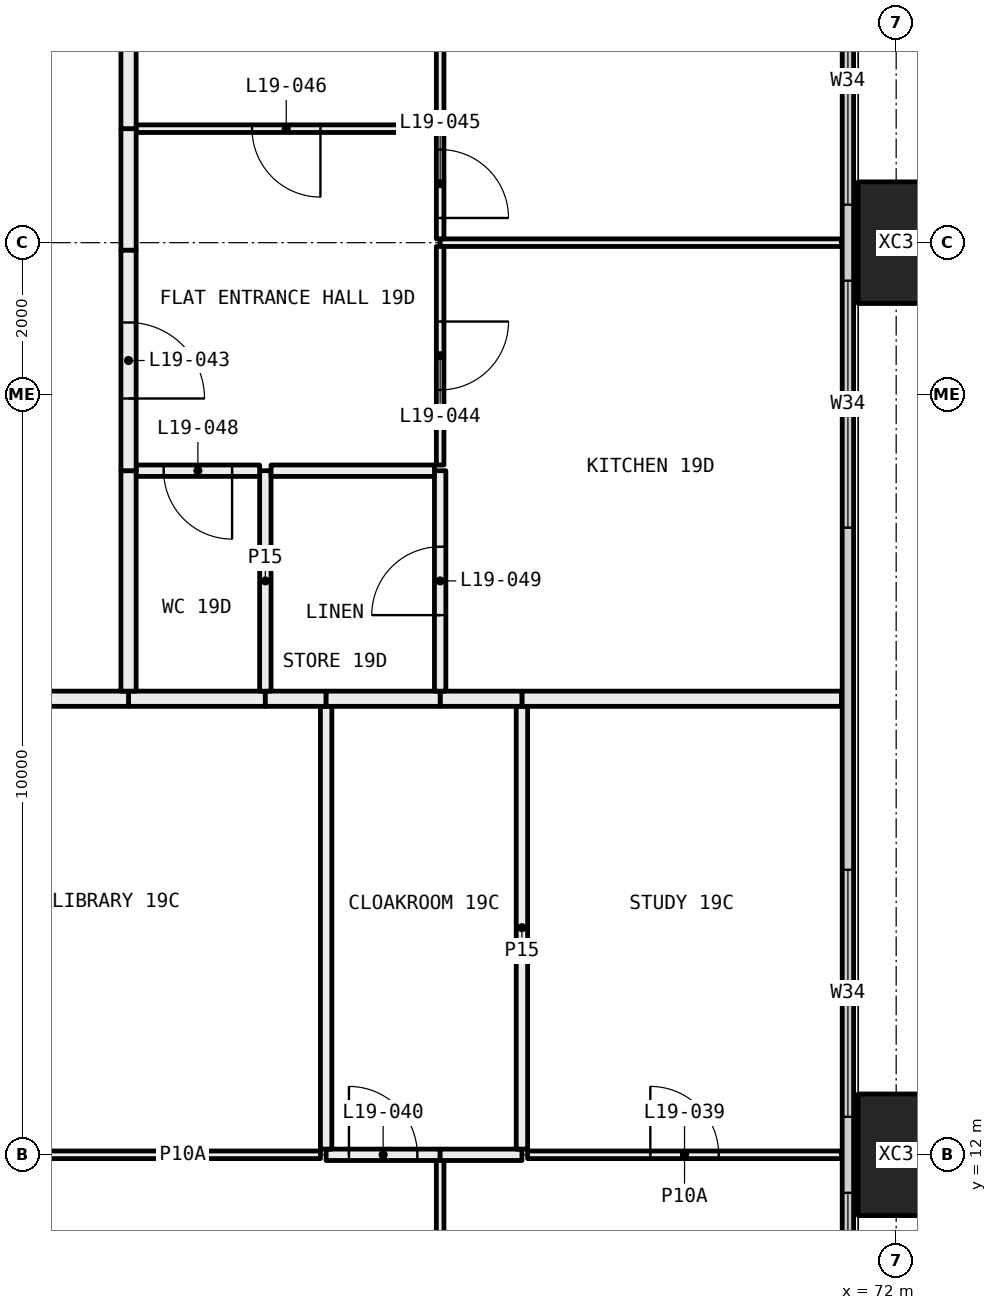
"""IFC4 building model, lengths in metres.
Left out: names, types, materials, properties, quantities, classifications, styles, units other than length and angle.
Written with IfcOpenShell. Run it as: python <this file> out.ifc"""

import sys

from ifc_helpers import new_model, si_unit, direction, frame, frame_2d, origin, origin_2d, place, context, subcontext, project, spatial, rectangle, hollow_rectangle, extrude, element, fill, save


model = new_model("IFC4")
c1 = context("Model", 3, precision=1e-05, world=origin(), true_north=direction((0.0, 1.0)))
c2 = subcontext(c1, "Body", "Model", "MODEL_VIEW")
j1 = project(units=[si_unit("LENGTHUNIT", "METRE"), si_unit("PLANEANGLEUNIT", "RADIAN")], contexts=[c1])
p1 = place(None, origin())
s1 = spatial("IfcSite", under=j1, at=p1, CompositionType="ELEMENT")
p2 = place(p1, origin())
s2 = spatial("IfcBuilding", under=s1, at=p2, CompositionType="ELEMENT")
p3 = place(p2, frame((0.0, 0.0, 78.3)))
s3 = spatial("IfcBuildingStorey", under=s2, at=p3, CompositionType="ELEMENT", Elevation=78.3)
for number, where, z_axis, x_axis in (
    (1, (72.0, 12.0, -0.4), (0.0, 0.0, 1.0), (0.0, 1.0, 0.0)),
    (2, (72.0, 24.0, -0.4), (0.0, 0.0, 1.0), (0.0, 1.0, 0.0)),
):
    element("IfcColumn", number, at=place(p3, frame(where, z_axis=z_axis, x_axis=x_axis)), inside=s3, PredefinedType="COLUMN", context=c2, shape_type="SweptSolid", body=[
        extrude(hollow_rectangle(XDim=1.6, YDim=1.0, WallThickness=0.065, at=origin_2d()), origin(), (0.0, 0.0, 1.0), 3.45),
    ])
p4 = place(p3, frame((71.365, 6.71, 0.0), z_axis=(0.0, 0.0, 1.0), x_axis=(0.0, 1.0, 0.0)))
e3 = element("IfcWall", 3, at=p4, inside=s3, PredefinedType="ELEMENTEDWALL", context=c2, shape_type="SweptSolid", body=[
    extrude(rectangle(XDim=34.58, YDim=0.15, at=frame_2d((17.29, 0.0))), origin(), (0.0, 0.0, 1.0), 3.05),
])
p5 = place(p4, frame((0.29, 0.0, 0.45)))
e4 = element("IfcOpeningElement", 4, at=p5, cuts=e3, PredefinedType="OPENING", context=c2, shape_type="SweptSolid", body=[
    extrude(rectangle(XDim=4.5, YDim=2.55, at=frame_2d((2.25, 1.275))), frame((0.0, 0.085, 0.0), z_axis=(0.0, -1.0, 0.0), x_axis=(1.0, 0.0, 0.0)), (0.0, 0.0, 1.0), 0.17),
])
p6 = place(p4, frame((5.79, 0.0, 0.45)))
e5 = element("IfcOpeningElement", 5, at=p6, cuts=e3, PredefinedType="OPENING", context=c2, shape_type="SweptSolid", body=[
    extrude(rectangle(XDim=3.25, YDim=2.55, at=frame_2d((1.625, 1.275))), frame((0.0, 0.085, 0.0), z_axis=(0.0, -1.0, 0.0), x_axis=(1.0, 0.0, 0.0)), (0.0, 0.0, 1.0), 0.17),
])
p7 = place(p4, frame((13.54, 0.0, 0.45)))
e6 = element("IfcOpeningElement", 6, at=p7, cuts=e3, PredefinedType="OPENING", context=c2, shape_type="SweptSolid", body=[
    extrude(rectangle(XDim=3.25, YDim=2.55, at=frame_2d((1.625, 1.275))), frame((0.0, 0.085, 0.0), z_axis=(0.0, -1.0, 0.0), x_axis=(1.0, 0.0, 0.0)), (0.0, 0.0, 1.0), 0.17),
])
p8 = place(p4, frame((17.79, 0.0, 0.45)))
e7 = element("IfcOpeningElement", 7, at=p8, cuts=e3, PredefinedType="OPENING", context=c2, shape_type="SweptSolid", body=[
    extrude(rectangle(XDim=3.25, YDim=2.55, at=frame_2d((1.625, 1.275))), frame((0.0, 0.085, 0.0), z_axis=(0.0, -1.0, 0.0), x_axis=(1.0, 0.0, 0.0)), (0.0, 0.0, 1.0), 0.17),
])
p9 = place(p4, frame((26.79, 0.0, 0.45)))
e8 = element("IfcOpeningElement", 8, at=p9, cuts=e3, PredefinedType="OPENING", context=c2, shape_type="SweptSolid", body=[
    extrude(rectangle(XDim=2.0, YDim=2.55, at=frame_2d((1.0, 1.275))), frame((0.0, 0.085, 0.0), z_axis=(0.0, -1.0, 0.0), x_axis=(1.0, 0.0, 0.0)), (0.0, 0.0, 1.0), 0.17),
])
p10 = place(p4, frame((29.79, 0.0, 0.45)))
e9 = element("IfcOpeningElement", 9, at=p10, cuts=e3, PredefinedType="OPENING", context=c2, shape_type="SweptSolid", body=[
    extrude(rectangle(XDim=4.5, YDim=2.55, at=frame_2d((2.25, 1.275))), frame((0.0, 0.085, 0.0), z_axis=(0.0, -1.0, 0.0), x_axis=(1.0, 0.0, 0.0)), (0.0, 0.0, 1.0), 0.17),
])
p11 = place(p3, frame((66.0, 6.72, 0.0), z_axis=(0.0, 0.0, 1.0), x_axis=(0.0, 1.0, 0.0)))
e10 = element("IfcWall", 10, at=p11, inside=s3, PredefinedType="PARTITIONING", context=c2, shape_type="SweptSolid", body=[
    extrude(rectangle(XDim=5.205, YDim=0.1, at=frame_2d((2.603, 0.0))), origin(), (0.0, 0.0, 1.0), 2.45),
])
p12 = place(p11, frame((2.153, 0.0, 0.0)))
e11 = element("IfcOpeningElement", 11, at=p12, cuts=e10, PredefinedType="OPENING", context=c2, shape_type="SweptSolid", body=[
    extrude(rectangle(XDim=0.9, YDim=2.1, at=frame_2d((0.45, 1.05))), frame((0.0, 0.06, 0.0), z_axis=(0.0, -1.0, 0.0), x_axis=(1.0, 0.0, 0.0)), (0.0, 0.0, 1.0), 0.12),
])
p13 = place(p3, frame((64.425, 12.0, 0.0), z_axis=(0.0, 0.0, 1.0), x_axis=(-1.0, 0.0, 0.0)))
e12 = element("IfcWall", 12, at=p13, inside=s3, PredefinedType="PARTITIONING", context=c2, shape_type="SweptSolid", body=[
    extrude(rectangle(XDim=3.625, YDim=0.1, at=frame_2d((1.812, 0.0))), origin(), (0.0, 0.0, 1.0), 2.45),
])
p14 = place(p3, frame((66.0, 12.0, 0.0), z_axis=(0.0, 0.0, 1.0), x_axis=(-1.0, 0.0, 0.0)))
e13 = element("IfcWall", 13, at=p14, inside=s3, PredefinedType="PARTITIONING", context=c2, shape_type="SweptSolid", body=[
    extrude(rectangle(XDim=1.5, YDim=0.15, at=frame_2d((0.75, 0.0))), origin(), (0.0, 0.0, 1.0), 2.45),
])
p15 = place(p14, frame((0.3, 0.0, 0.0)))
e14 = element("IfcOpeningElement", 14, at=p15, cuts=e13, PredefinedType="OPENING", context=c2, shape_type="SweptSolid", body=[
    extrude(rectangle(XDim=0.9, YDim=2.1, at=frame_2d((0.45, 1.05))), frame((0.0, 0.085, 0.0), z_axis=(0.0, -1.0, 0.0), x_axis=(1.0, 0.0, 0.0)), (0.0, 0.0, 1.0), 0.17),
])
p16 = place(p3, frame((71.28, 12.0, 0.0), z_axis=(0.0, 0.0, 1.0), x_axis=(-1.0, 0.0, 0.0)))
e15 = element("IfcWall", 15, at=p16, inside=s3, PredefinedType="PARTITIONING", context=c2, shape_type="SweptSolid", body=[
    extrude(rectangle(XDim=4.129, YDim=0.1, at=frame_2d((2.064, 0.0))), origin(), (0.0, 0.0, 1.0), 2.45),
])
p17 = place(p16, frame((1.615, 0.0, 0.0)))
e16 = element("IfcOpeningElement", 16, at=p17, cuts=e15, PredefinedType="OPENING", context=c2, shape_type="SweptSolid", body=[
    extrude(rectangle(XDim=0.9, YDim=2.1, at=frame_2d((0.45, 1.05))), frame((0.0, 0.06, 0.0), z_axis=(0.0, -1.0, 0.0), x_axis=(1.0, 0.0, 0.0)), (0.0, 0.0, 1.0), 0.12),
])
p18 = place(p3, frame((67.076, 12.0, 0.0), z_axis=(0.0, 0.0, 1.0), x_axis=(-1.0, 0.0, 0.0)))
e17 = element("IfcWall", 17, at=p18, inside=s3, PredefinedType="PARTITIONING", context=c2, shape_type="SweptSolid", body=[
    extrude(rectangle(XDim=1.076, YDim=0.15, at=frame_2d((0.538, 0.0))), origin(), (0.0, 0.0, 1.0), 2.45),
])
p19 = place(p3, frame((64.5, 12.075, 0.0), z_axis=(0.0, 0.0, 1.0), x_axis=(0.0, 1.0, 0.0)))
e18 = element("IfcWall", 18, at=p19, inside=s3, PredefinedType="PARTITIONING", context=c2, shape_type="SweptSolid", body=[
    extrude(rectangle(XDim=5.825, YDim=0.15, at=frame_2d((2.913, 0.0))), origin(), (0.0, 0.0, 1.0), 2.45),
])
p20 = place(p3, frame((63.7, 18.0, 0.0), z_axis=(0.0, 0.0, 1.0), x_axis=(-1.0, 0.0, 0.0)))
e19 = element("IfcWall", 19, at=p20, inside=s3, PredefinedType="PARTITIONING", context=c2, shape_type="SweptSolid", body=[
    extrude(rectangle(XDim=1.8, YDim=0.2, at=frame_2d((0.9, 0.0))), origin(), (0.0, 0.0, 1.0), 3.05),
])
p21 = place(p3, frame((64.5, 18.0, 0.0), z_axis=(0.0, 0.0, 1.0), x_axis=(-1.0, 0.0, 0.0)))
e20 = element("IfcWall", 20, at=p21, inside=s3, PredefinedType="PARTITIONING", context=c2, shape_type="SweptSolid", body=[
    extrude(rectangle(XDim=0.8, YDim=0.2, at=frame_2d((0.4, 0.0))), origin(), (0.0, 0.0, 1.0), 3.05),
])
p22 = place(p3, frame((61.9, 18.0, 0.0), z_axis=(0.0, 0.0, 1.0), x_axis=(-1.0, 0.0, 0.0)))
e21 = element("IfcWall", 21, at=p22, inside=s3, PredefinedType="PARTITIONING", context=c2, shape_type="SweptSolid", body=[
    extrude(rectangle(XDim=4.9, YDim=0.2, at=frame_2d((2.45, 0.0))), origin(), (0.0, 0.0, 1.0), 3.05),
])
p23 = place(p3, frame((67.076, 17.9, 0.0), z_axis=(0.0, 0.0, 1.0), x_axis=(0.0, -1.0, 0.0)))
e22 = element("IfcWall", 22, at=p23, inside=s3, PredefinedType="PARTITIONING", context=c2, shape_type="SweptSolid", body=[
    extrude(rectangle(XDim=5.825, YDim=0.15, at=frame_2d((2.913, 0.0))), origin(), (0.0, 0.0, 1.0), 2.45),
])
p24 = place(p3, frame((71.28, 18.0, 0.0), z_axis=(0.0, 0.0, 1.0), x_axis=(-1.0, 0.0, 0.0)))
e23 = element("IfcWall", 23, at=p24, inside=s3, PredefinedType="PARTITIONING", context=c2, shape_type="SweptSolid", body=[
    extrude(rectangle(XDim=4.204, YDim=0.2, at=frame_2d((2.102, 0.0))), origin(), (0.0, 0.0, 1.0), 3.05),
])
p25 = place(p3, frame((67.076, 18.0, 0.0), z_axis=(0.0, 0.0, 1.0), x_axis=(-1.0, 0.0, 0.0)))
e24 = element("IfcWall", 24, at=p25, inside=s3, PredefinedType="PARTITIONING", context=c2, shape_type="SweptSolid", body=[
    extrude(rectangle(XDim=1.076, YDim=0.2, at=frame_2d((0.538, 0.0))), origin(), (0.0, 0.0, 1.0), 3.05),
])
p26 = place(p3, frame((66.0, 18.0, 0.0), z_axis=(0.0, 0.0, 1.0), x_axis=(-1.0, 0.0, 0.0)))
e25 = element("IfcWall", 25, at=p26, inside=s3, PredefinedType="PARTITIONING", context=c2, shape_type="SweptSolid", body=[
    extrude(rectangle(XDim=1.5, YDim=0.2, at=frame_2d((0.75, 0.0))), origin(), (0.0, 0.0, 1.0), 3.05),
])
p27 = place(p3, frame((71.28, 24.0, 0.0), z_axis=(0.0, 0.0, 1.0), x_axis=(-1.0, 0.0, 0.0)))
e26 = element("IfcWall", 26, at=p27, inside=s3, PredefinedType="PARTITIONING", context=c2, shape_type="SweptSolid", body=[
    extrude(rectangle(XDim=5.28, YDim=0.1, at=frame_2d((2.64, 0.0))), origin(), (0.0, 0.0, 1.0), 2.45),
])
p28 = place(p3, frame((66.0, 21.0, 0.0), z_axis=(0.0, 0.0, 1.0), x_axis=(0.0, -1.0, 0.0)))
e27 = element("IfcWall", 27, at=p28, inside=s3, PredefinedType="PARTITIONING", context=c2, shape_type="SweptSolid", body=[
    extrude(rectangle(XDim=2.9, YDim=0.15, at=frame_2d((1.45, 0.0))), origin(), (0.0, 0.0, 1.0), 3.05),
])
p29 = place(p28, frame((1.0, 0.0, 0.0)))
e28 = element("IfcOpeningElement", 28, at=p29, cuts=e27, PredefinedType="OPENING", context=c2, shape_type="SweptSolid", body=[
    extrude(rectangle(XDim=0.9, YDim=2.1, at=frame_2d((0.45, 1.05))), frame((0.0, 0.085, 0.0), z_axis=(0.0, -1.0, 0.0), x_axis=(1.0, 0.0, 0.0)), (0.0, 0.0, 1.0), 0.17),
])
p30 = place(p3, frame((66.0, 23.95, 0.0), z_axis=(0.0, 0.0, 1.0), x_axis=(0.0, -1.0, 0.0)))
e29 = element("IfcWall", 29, at=p30, inside=s3, PredefinedType="PARTITIONING", context=c2, shape_type="SweptSolid", body=[
    extrude(rectangle(XDim=2.875, YDim=0.1, at=frame_2d((1.438, 0.0))), origin(), (0.0, 0.0, 1.0), 2.45),
])
p31 = place(p30, frame((0.988, 0.0, 0.0)))
e30 = element("IfcOpeningElement", 30, at=p31, cuts=e29, PredefinedType="OPENING", context=c2, shape_type="SweptSolid", body=[
    extrude(rectangle(XDim=0.9, YDim=2.1, at=frame_2d((0.45, 1.05))), frame((0.0, 0.06, 0.0), z_axis=(0.0, -1.0, 0.0), x_axis=(1.0, 0.0, 0.0)), (0.0, 0.0, 1.0), 0.12),
])
p32 = place(p3, frame((66.0, 25.5, 0.0), z_axis=(0.0, 0.0, 1.0), x_axis=(0.0, -1.0, 0.0)))
e31 = element("IfcWall", 31, at=p32, inside=s3, PredefinedType="PARTITIONING", context=c2, shape_type="SweptSolid", body=[
    extrude(rectangle(XDim=1.45, YDim=0.1, at=frame_2d((0.725, 0.0))), origin(), (0.0, 0.0, 1.0), 2.45),
])
p33 = place(p32, frame((0.275, 0.0, 0.0)))
e32 = element("IfcOpeningElement", 32, at=p33, cuts=e31, PredefinedType="OPENING", context=c2, shape_type="SweptSolid", body=[
    extrude(rectangle(XDim=0.9, YDim=2.1, at=frame_2d((0.45, 1.05))), frame((0.0, 0.06, 0.0), z_axis=(0.0, -1.0, 0.0), x_axis=(1.0, 0.0, 0.0)), (0.0, 0.0, 1.0), 0.12),
])
p34 = place(p3, frame((66.0, 35.95, 0.0), z_axis=(0.0, 0.0, 1.0), x_axis=(0.0, -1.0, 0.0)))
e33 = element("IfcWall", 33, at=p34, inside=s3, PredefinedType="PARTITIONING", context=c2, shape_type="SweptSolid", body=[
    extrude(rectangle(XDim=10.45, YDim=0.1, at=frame_2d((5.225, 0.0))), origin(), (0.0, 0.0, 1.0), 2.45),
])
p35 = place(p3, frame((63.7, 18.1, 0.0), z_axis=(0.0, 0.0, 1.0), x_axis=(0.0, 1.0, 0.0)))
e34 = element("IfcWall", 34, at=p35, inside=s3, PredefinedType="PARTITIONING", context=c2, shape_type="SweptSolid", body=[
    extrude(rectangle(XDim=2.9, YDim=0.15, at=frame_2d((1.45, 0.0))), origin(), (0.0, 0.0, 1.0), 3.05),
])
p36 = place(p3, frame((63.625, 21.0, 0.0), z_axis=(0.0, 0.0, 1.0), x_axis=(-1.0, 0.0, 0.0)))
e35 = element("IfcWall", 35, at=p36, inside=s3, PredefinedType="PARTITIONING", context=c2, shape_type="SweptSolid", body=[
    extrude(rectangle(XDim=1.625, YDim=0.15, at=frame_2d((0.812, 0.0))), origin(), (0.0, 0.0, 1.0), 3.05),
])
p37 = place(p36, frame((0.363, 0.0, 0.0)))
e36 = element("IfcOpeningElement", 36, at=p37, cuts=e35, PredefinedType="OPENING", context=c2, shape_type="SweptSolid", body=[
    extrude(rectangle(XDim=0.9, YDim=2.1, at=frame_2d((0.45, 1.05))), frame((0.0, 0.085, 0.0), z_axis=(0.0, -1.0, 0.0), x_axis=(1.0, 0.0, 0.0)), (0.0, 0.0, 1.0), 0.17),
])
p38 = place(p3, frame((61.9, 21.0, 0.0), z_axis=(0.0, 0.0, 1.0), x_axis=(0.0, -1.0, 0.0)))
e37 = element("IfcWall", 37, at=p38, inside=s3, PredefinedType="PARTITIONING", context=c2, shape_type="SweptSolid", body=[
    extrude(rectangle(XDim=2.9, YDim=0.2, at=frame_2d((1.45, 0.0))), origin(), (0.0, 0.0, 1.0), 3.05),
])
p39 = place(p3, frame((65.925, 21.0, 0.0), z_axis=(0.0, 0.0, 1.0), x_axis=(-1.0, 0.0, 0.0)))
e38 = element("IfcWall", 38, at=p39, inside=s3, PredefinedType="PARTITIONING", context=c2, shape_type="SweptSolid", body=[
    extrude(rectangle(XDim=2.15, YDim=0.15, at=frame_2d((1.075, 0.0))), origin(), (0.0, 0.0, 1.0), 3.05),
])
p40 = place(p3, frame((65.95, 25.5, 0.0), z_axis=(0.0, 0.0, 1.0), x_axis=(-1.0, 0.0, 0.0)))
e39 = element("IfcWall", 39, at=p40, inside=s3, PredefinedType="PARTITIONING", context=c2, shape_type="SweptSolid", body=[
    extrude(rectangle(XDim=3.95, YDim=0.1, at=frame_2d((1.975, 0.0))), origin(), (0.0, 0.0, 1.0), 3.05),
])
p41 = place(p40, frame((1.525, 0.0, 0.0)))
e40 = element("IfcOpeningElement", 40, at=p41, cuts=e39, PredefinedType="OPENING", context=c2, shape_type="SweptSolid", body=[
    extrude(rectangle(XDim=0.9, YDim=2.1, at=frame_2d((0.45, 1.05))), frame((0.0, 0.06, 0.0), z_axis=(0.0, -1.0, 0.0), x_axis=(1.0, 0.0, 0.0)), (0.0, 0.0, 1.0), 0.12),
])
p42 = place(p3, frame((61.9, 25.5, 0.0), z_axis=(0.0, 0.0, 1.0), x_axis=(0.0, -1.0, 0.0)))
e41 = element("IfcWall", 41, at=p42, inside=s3, PredefinedType="PARTITIONING", context=c2, shape_type="SweptSolid", body=[
    extrude(rectangle(XDim=1.6, YDim=0.2, at=frame_2d((0.8, 0.0))), origin(), (0.0, 0.0, 1.0), 2.45),
])
p43 = place(p3, frame((61.9, 23.9, 0.0), z_axis=(0.0, 0.0, 1.0), x_axis=(0.0, -1.0, 0.0)))
e42 = element("IfcWall", 42, at=p43, inside=s3, PredefinedType="PARTITIONING", context=c2, shape_type="SweptSolid", body=[
    extrude(rectangle(XDim=2.9, YDim=0.2, at=frame_2d((1.45, 0.0))), origin(), (0.0, 0.0, 1.0), 3.05),
])
p44 = place(p43, frame((0.95, 0.0, 0.0)))
e43 = element("IfcOpeningElement", 43, at=p44, cuts=e42, PredefinedType="OPENING", context=c2, shape_type="SweptSolid", body=[
    extrude(rectangle(XDim=1.0, YDim=2.1, at=frame_2d((0.5, 1.05))), frame((0.0, 0.11, 0.0), z_axis=(0.0, -1.0, 0.0), x_axis=(1.0, 0.0, 0.0)), (0.0, 0.0, 1.0), 0.22),
])
p45 = place(p3, frame((61.9, 35.9, 0.0), z_axis=(0.0, 0.0, 1.0), x_axis=(0.0, -1.0, 0.0)))
e44 = element("IfcWall", 44, at=p45, inside=s3, PredefinedType="PARTITIONING", context=c2, shape_type="SweptSolid", body=[
    extrude(rectangle(XDim=10.4, YDim=0.2, at=frame_2d((5.2, 0.0))), origin(), (0.0, 0.0, 1.0), 3.05),
])
p46 = place(p5, origin())
e45 = element("IfcWindow", 45, at=p46, inside=s3, PartitioningType="SINGLE_PANEL", PredefinedType="WINDOW", context=c2, shape_type="SweptSolid", body=[
    extrude(rectangle(XDim=4.5, YDim=2.55, at=frame_2d((2.25, 1.275))), frame((0.0, 0.03, 0.0), z_axis=(0.0, -1.0, 0.0), x_axis=(1.0, 0.0, 0.0)), (0.0, 0.0, 1.0), 0.06),
])
fill(e4, e45)
p47 = place(p6, origin())
e46 = element("IfcWindow", 46, at=p47, inside=s3, PartitioningType="SINGLE_PANEL", PredefinedType="WINDOW", context=c2, shape_type="SweptSolid", body=[
    extrude(rectangle(XDim=3.25, YDim=2.55, at=frame_2d((1.625, 1.275))), frame((0.0, 0.03, 0.0), z_axis=(0.0, -1.0, 0.0), x_axis=(1.0, 0.0, 0.0)), (0.0, 0.0, 1.0), 0.06),
])
fill(e5, e46)
p48 = place(p7, origin())
e47 = element("IfcWindow", 47, at=p48, inside=s3, PartitioningType="SINGLE_PANEL", PredefinedType="WINDOW", context=c2, shape_type="SweptSolid", body=[
    extrude(rectangle(XDim=3.25, YDim=2.55, at=frame_2d((1.625, 1.275))), frame((0.0, 0.03, 0.0), z_axis=(0.0, -1.0, 0.0), x_axis=(1.0, 0.0, 0.0)), (0.0, 0.0, 1.0), 0.06),
])
fill(e6, e47)
p49 = place(p8, origin())
e48 = element("IfcWindow", 48, at=p49, inside=s3, PartitioningType="SINGLE_PANEL", PredefinedType="WINDOW", context=c2, shape_type="SweptSolid", body=[
    extrude(rectangle(XDim=3.25, YDim=2.55, at=frame_2d((1.625, 1.275))), frame((0.0, 0.03, 0.0), z_axis=(0.0, -1.0, 0.0), x_axis=(1.0, 0.0, 0.0)), (0.0, 0.0, 1.0), 0.06),
])
fill(e7, e48)
p50 = place(p17, frame((0.9, 0.0, 0.0), x_axis=(-1.0, 0.0, 0.0)))
e49 = element("IfcDoor", 49, at=p50, inside=s3, OperationType="SINGLE_SWING_RIGHT", PredefinedType="DOOR", context=c2, shape_type="SweptSolid", body=[
    extrude(rectangle(XDim=0.9, YDim=2.1, at=frame_2d((0.45, 1.05))), frame((0.0, 0.025, 0.0), z_axis=(0.0, -1.0, 0.0), x_axis=(1.0, 0.0, 0.0)), (0.0, 0.0, 1.0), 0.05),
])
fill(e16, e49)
p51 = place(p15, frame((0.9, 0.0, 0.0), x_axis=(-1.0, 0.0, 0.0)))
e50 = element("IfcDoor", 50, at=p51, inside=s3, OperationType="SINGLE_SWING_RIGHT", PredefinedType="DOOR", context=c2, shape_type="SweptSolid", body=[
    extrude(rectangle(XDim=0.9, YDim=2.1, at=frame_2d((0.45, 1.05))), frame((0.0, 0.025, 0.0), z_axis=(0.0, -1.0, 0.0), x_axis=(1.0, 0.0, 0.0)), (0.0, 0.0, 1.0), 0.05),
])
fill(e14, e50)
p52 = place(p44, origin())
e51 = element("IfcDoor", 51, at=p52, inside=s3, OperationType="SINGLE_SWING_LEFT", PredefinedType="DOOR", context=c2, shape_type="SweptSolid", body=[
    extrude(rectangle(XDim=1.0, YDim=2.1, at=frame_2d((0.5, 1.05))), frame((0.0, 0.025, 0.0), z_axis=(0.0, -1.0, 0.0), x_axis=(1.0, 0.0, 0.0)), (0.0, 0.0, 1.0), 0.05),
])
fill(e43, e51)
p53 = place(p31, origin())
e52 = element("IfcDoor", 52, at=p53, inside=s3, OperationType="SINGLE_SWING_RIGHT", PredefinedType="DOOR", context=c2, shape_type="SweptSolid", body=[
    extrude(rectangle(XDim=0.9, YDim=2.1, at=frame_2d((0.45, 1.05))), frame((0.0, 0.025, 0.0), z_axis=(0.0, -1.0, 0.0), x_axis=(1.0, 0.0, 0.0)), (0.0, 0.0, 1.0), 0.05),
])
fill(e30, e52)
p54 = place(p33, origin())
e53 = element("IfcDoor", 53, at=p54, inside=s3, OperationType="SINGLE_SWING_LEFT", PredefinedType="DOOR", context=c2, shape_type="SweptSolid", body=[
    extrude(rectangle(XDim=0.9, YDim=2.1, at=frame_2d((0.45, 1.05))), frame((0.0, 0.025, 0.0), z_axis=(0.0, -1.0, 0.0), x_axis=(1.0, 0.0, 0.0)), (0.0, 0.0, 1.0), 0.05),
])
fill(e32, e53)
p55 = place(p41, origin())
e54 = element("IfcDoor", 54, at=p55, inside=s3, OperationType="SINGLE_SWING_RIGHT", PredefinedType="DOOR", context=c2, shape_type="SweptSolid", body=[
    extrude(rectangle(XDim=0.9, YDim=2.1, at=frame_2d((0.45, 1.05))), frame((0.0, 0.025, 0.0), z_axis=(0.0, -1.0, 0.0), x_axis=(1.0, 0.0, 0.0)), (0.0, 0.0, 1.0), 0.05),
])
fill(e40, e54)
p56 = place(p37, origin())
e55 = element("IfcDoor", 55, at=p56, inside=s3, OperationType="SINGLE_SWING_RIGHT", PredefinedType="DOOR", context=c2, shape_type="SweptSolid", body=[
    extrude(rectangle(XDim=0.9, YDim=2.1, at=frame_2d((0.45, 1.05))), frame((0.0, 0.025, 0.0), z_axis=(0.0, -1.0, 0.0), x_axis=(1.0, 0.0, 0.0)), (0.0, 0.0, 1.0), 0.05),
])
fill(e36, e55)
p57 = place(p29, frame((0.9, 0.0, 0.0), x_axis=(-1.0, 0.0, 0.0)))
e56 = element("IfcDoor", 56, at=p57, inside=s3, OperationType="SINGLE_SWING_RIGHT", PredefinedType="DOOR", context=c2, shape_type="SweptSolid", body=[
    extrude(rectangle(XDim=0.9, YDim=2.1, at=frame_2d((0.45, 1.05))), frame((0.0, 0.025, 0.0), z_axis=(0.0, -1.0, 0.0), x_axis=(1.0, 0.0, 0.0)), (0.0, 0.0, 1.0), 0.05),
])
fill(e28, e56)
save(model, sys.argv[1])
